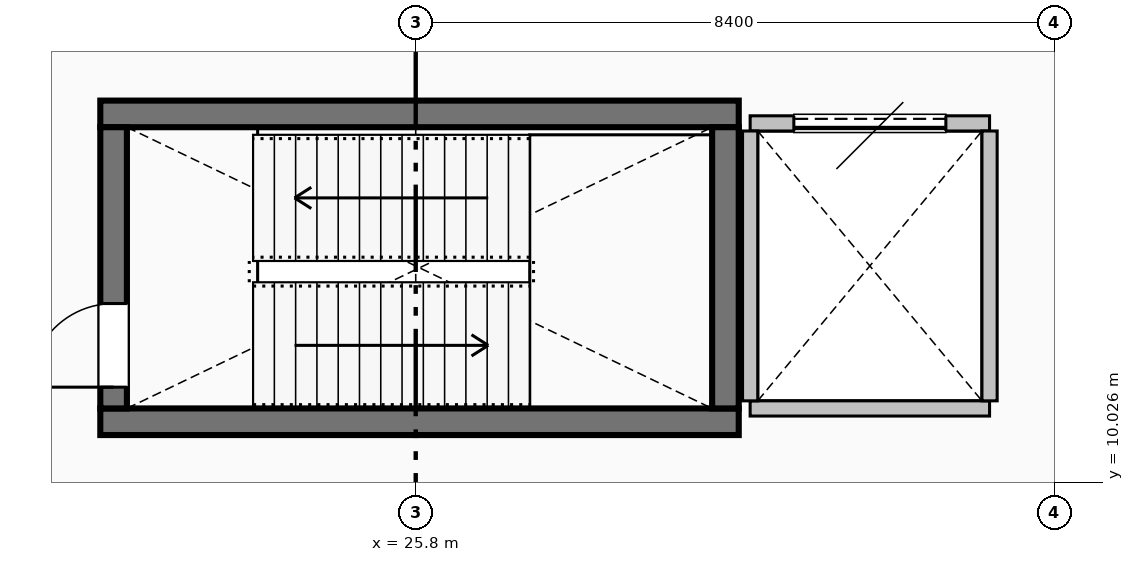
"""IFC4 building model, lengths in metres.
Left out: names, types, materials, properties, quantities, classifications, styles, units other than length and angle.
Written with IfcOpenShell. Run it as: python <this file> out.ifc"""

import sys

from ifc_helpers import new_model, si_unit, direction, frame, frame_2d, origin, place, context, subcontext, project, spatial, rectangle, extrude, element, fill, save


model = new_model("IFC4")
c1 = context("Model", 3, precision=1e-05, world=origin(), true_north=direction((0.0, 1.0)))
c2 = subcontext(c1, "Body", "Model", "MODEL_VIEW")
j1 = project(units=[si_unit("LENGTHUNIT", "METRE"), si_unit("PLANEANGLEUNIT", "RADIAN")], contexts=[c1])
p1 = place(None, origin())
s1 = spatial("IfcSite", under=j1, at=p1, CompositionType="ELEMENT")
p2 = place(p1, origin())
s2 = spatial("IfcBuilding", under=s1, at=p2, CompositionType="ELEMENT")
p3 = place(p2, frame((0.0, 0.0, -4.8)))
s3 = spatial("IfcBuildingStorey", under=s2, at=p3, CompositionType="ELEMENT", Elevation=-4.8)
for number, where, z_axis, x_axis in (
    (1, (21.65, 10.825, 0.0), (0.0, 0.0, 1.0), (1.0, 0.0, 0.0)),
    (2, (30.05, 14.875, 0.0), (0.0, 0.0, 1.0), (-1.0, 0.0, 0.0)),
):
    element("IfcWall", number, at=place(p3, frame(where, z_axis=z_axis, x_axis=x_axis)), inside=s3, PredefinedType="SHEAR", context=c2, shape_type="SweptSolid", body=[
        extrude(rectangle(XDim=8.4, YDim=0.35, at=frame_2d((4.2, 0.0))), origin(), (0.0, 0.0, 1.0), 4.5),
    ])
p4 = place(p3, frame((21.825, 11.0, 0.0), z_axis=(0.0, 0.0, 1.0), x_axis=(0.0, 1.0, 0.0)))
e3 = element("IfcWall", 3, at=p4, inside=s3, PredefinedType="SHEAR", context=c2, shape_type="SweptSolid", body=[
    extrude(rectangle(XDim=3.7, YDim=0.35, at=frame_2d((1.85, 0.0))), origin(), (0.0, 0.0, 1.0), 4.5),
])
p5 = place(p4, frame((0.28, 0.0, 0.0)))
e4 = element("IfcOpeningElement", 4, at=p5, cuts=e3, PredefinedType="OPENING", context=c2, shape_type="SweptSolid", body=[
    extrude(rectangle(XDim=1.1, YDim=2.08, at=frame_2d((0.55, 1.04))), frame((0.0, 0.185, 0.0), z_axis=(0.0, -1.0, 0.0), x_axis=(1.0, 0.0, 0.0)), (0.0, 0.0, 1.0), 0.37),
])
p6 = place(p3, frame((29.875, 14.7, 0.0), z_axis=(0.0, 0.0, 1.0), x_axis=(0.0, -1.0, 0.0)))
e5 = element("IfcWall", 5, at=p6, inside=s3, PredefinedType="SHEAR", context=c2, shape_type="SweptSolid", body=[
    extrude(rectangle(XDim=3.7, YDim=0.35, at=frame_2d((1.85, 0.0))), origin(), (0.0, 0.0, 1.0), 4.5),
])
p7 = place(p3, frame((30.2, 11.0, 0.0), z_axis=(0.0, 0.0, 1.0), x_axis=(1.0, 0.0, 0.0)))
e6 = element("IfcWall", 6, at=p7, inside=s3, PredefinedType="PARTITIONING", context=c2, shape_type="SweptSolid", body=[
    extrude(rectangle(XDim=3.15, YDim=0.2, at=frame_2d((1.575, 0.0))), origin(), (0.0, 0.0, 1.0), 4.492),
])
p8 = place(p3, frame((33.35, 14.75, 0.0), z_axis=(0.0, 0.0, 1.0), x_axis=(-1.0, 0.0, 0.0)))
e7 = element("IfcWall", 7, at=p8, inside=s3, PredefinedType="PARTITIONING", context=c2, shape_type="SweptSolid", body=[
    extrude(rectangle(XDim=3.15, YDim=0.2, at=frame_2d((1.575, 0.0))), origin(), (0.0, 0.0, 1.0), 4.492),
])
p9 = place(p8, frame((0.575, 0.0, 0.0)))
e8 = element("IfcOpeningElement", 8, at=p9, cuts=e7, PredefinedType="OPENING", context=c2, shape_type="SweptSolid", body=[
    extrude(rectangle(XDim=2.0, YDim=2.35, at=frame_2d((1.0, 1.175))), frame((0.0, 0.11, 0.0), z_axis=(0.0, -1.0, 0.0), x_axis=(1.0, 0.0, 0.0)), (0.0, 0.0, 1.0), 0.22),
])
for number, where, z_axis, x_axis in (
    (9, (30.2, 11.1, 0.0), (0.0, 0.0, 1.0), (0.0, 1.0, 0.0)),
    (10, (33.35, 14.65, 0.0), (0.0, 0.0, 1.0), (0.0, -1.0, 0.0)),
):
    element("IfcWall", number, at=place(p3, frame(where, z_axis=z_axis, x_axis=x_axis)), inside=s3, PredefinedType="PARTITIONING", context=c2, shape_type="SweptSolid", body=[
        extrude(rectangle(XDim=3.55, YDim=0.2, at=frame_2d((1.775, 0.0))), origin(), (0.0, 0.0, 1.0), 4.492),
    ])
p10 = place(p5, origin())
e11 = element("IfcDoor", 11, at=p10, inside=s3, OperationType="SINGLE_SWING_LEFT", PredefinedType="DOOR", context=c2, shape_type="SweptSolid", body=[
    extrude(rectangle(XDim=1.1, YDim=2.08, at=frame_2d((0.55, 1.04))), frame((0.0, 0.025, 0.0), z_axis=(0.0, -1.0, 0.0), x_axis=(1.0, 0.0, 0.0)), (0.0, 0.0, 1.0), 0.05),
])
fill(e4, e11)
p11 = place(p9, origin())
e12 = element("IfcDoor", 12, at=p11, inside=s3, OperationType="SLIDING_TO_LEFT", PredefinedType="DOOR", context=c2, shape_type="SweptSolid", body=[
    extrude(rectangle(XDim=2.0, YDim=2.35, at=frame_2d((1.0, 1.175))), frame((0.0, 0.025, 0.0), z_axis=(0.0, -1.0, 0.0), x_axis=(1.0, 0.0, 0.0)), (0.0, 0.0, 1.0), 0.05),
])
fill(e8, e12)
save(model, sys.argv[1])
